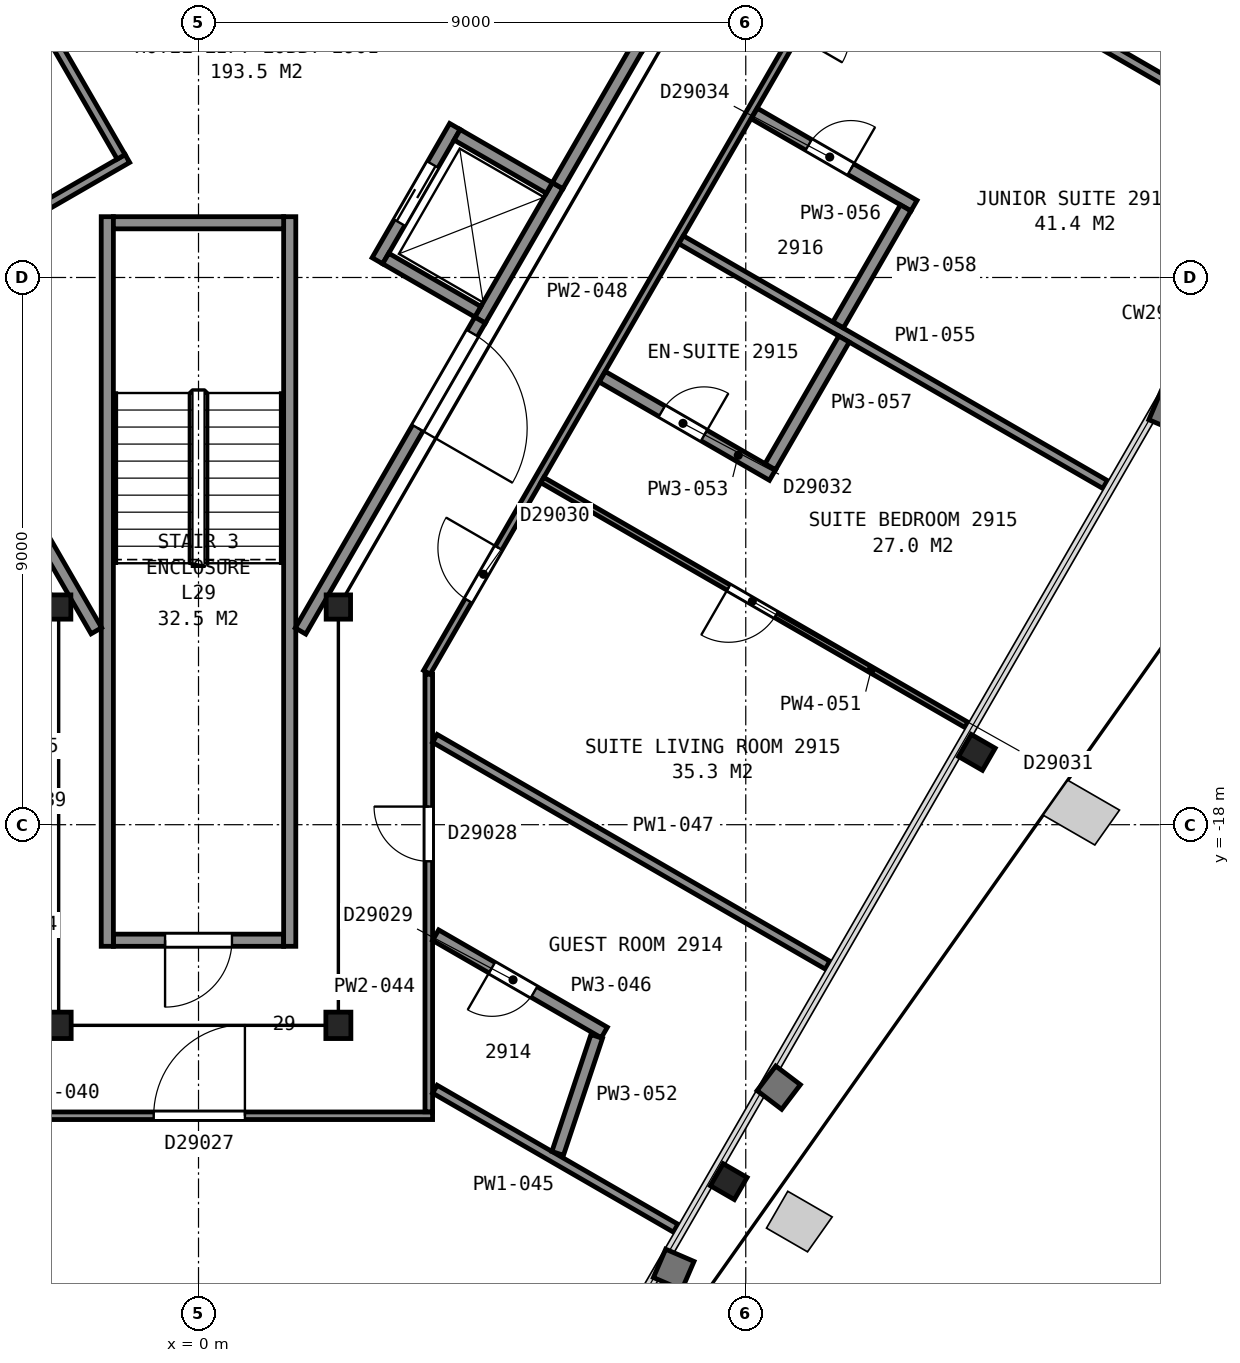
"""IFC4 building model, lengths in metres.
Left out: names, types, materials, properties, quantities, classifications, styles, units other than length and angle.
Written with IfcOpenShell. Run it as: python <this file> out.ifc"""

import sys

from ifc_helpers import new_model, si_unit, direction, frame, frame_2d, origin, origin_2d, place, context, subcontext, project, spatial, rectangle, i_section, extrude, element, fill, save


model = new_model("IFC4")
c1 = context("Model", 3, precision=1e-05, world=origin(), true_north=direction((0.0, 1.0)))
c2 = subcontext(c1, "Body", "Model", "MODEL_VIEW")
j1 = project(units=[si_unit("LENGTHUNIT", "METRE"), si_unit("PLANEANGLEUNIT", "RADIAN")], contexts=[c1])
p1 = place(None, origin())
s1 = spatial("IfcSite", under=j1, at=p1, CompositionType="ELEMENT")
p2 = place(p1, origin())
s2 = spatial("IfcBuilding", under=s1, at=p2, CompositionType="ELEMENT")
p3 = place(p2, frame((0.0, 0.0, 121.6)))
s3 = spatial("IfcBuildingStorey", under=s2, at=p3, CompositionType="ELEMENT", Elevation=121.6)
p4 = place(p3, frame((8.72, -23.87, 0.045), z_axis=(0.0, 0.0, 1.0), x_axis=(-0.5, -0.866025403784, 0.0)))
e1 = element("IfcColumn", 1, at=p4, inside=s3, PredefinedType="COLUMN", context=c2, shape_type="SweptSolid", body=[
    extrude(i_section(OverallWidth=0.419, OverallDepth=0.455, WebThickness=0.042, FlangeThickness=0.068, FilletRadius=0.015, at=origin_2d()), origin(), (0.0, 0.0, 1.0), 3.555),
])
p5 = place(p3, frame((12.8, -16.81, 0.04), z_axis=(0.0, 0.0, 1.0), x_axis=(-0.5, -0.866025403784, 0.0)))
e2 = element("IfcColumn", 2, at=p5, inside=s3, PredefinedType="COLUMN", context=c2, shape_type="SweptSolid", body=[
    extrude(i_section(OverallWidth=0.419, OverallDepth=0.455, WebThickness=0.042, FlangeThickness=0.068, FilletRadius=0.015, at=origin_2d()), origin(), (0.0, 0.0, 1.0), 3.56),
])
p6 = place(p3, frame((-2.3, -14.42, 0.0), z_axis=(0.0, 0.0, 1.0), x_axis=(1.0, 0.0, 0.0)))
e3 = element("IfcColumn", 3, at=p6, inside=s3, PredefinedType="COLUMN", context=c2, shape_type="SweptSolid", body=[
    extrude(i_section(OverallWidth=0.401, OverallDepth=0.399, WebThickness=0.025, FlangeThickness=0.04, FilletRadius=0.015, at=origin_2d()), origin(), (0.0, 0.0, 1.0), 3.6),
])
for number, where, z_axis, x_axis in (
    (4, (-2.3, -21.3, 0.0), (0.0, 0.0, 1.0), (-1.0, 0.0, 0.0)),
    (5, (2.3, -21.3, 0.0), (0.0, 0.0, 1.0), (-1.0, 0.0, 0.0)),
):
    element("IfcColumn", number, at=place(p3, frame(where, z_axis=z_axis, x_axis=x_axis)), inside=s3, PredefinedType="COLUMN", context=c2, shape_type="SweptSolid", body=[
        extrude(i_section(OverallWidth=0.411, OverallDepth=0.434, WebThickness=0.036, FlangeThickness=0.057, FilletRadius=0.015, at=origin_2d()), origin(), (0.0, 0.0, 1.0), 3.6),
    ])
p7 = place(p3, frame((2.3, -14.42, 0.0), z_axis=(0.0, 0.0, 1.0), x_axis=(1.0, 0.0, 0.0)))
e6 = element("IfcColumn", 6, at=p7, inside=s3, PredefinedType="COLUMN", context=c2, shape_type="SweptSolid", body=[
    extrude(i_section(OverallWidth=0.401, OverallDepth=0.399, WebThickness=0.025, FlangeThickness=0.04, FilletRadius=0.015, at=origin_2d()), origin(), (0.0, 0.0, 1.0), 3.6),
])
p8 = place(p3, frame((-1.4, -19.9, 0.0), z_axis=(0.0, 0.0, 1.0), x_axis=(1.0, 0.0, 0.0)))
e7 = element("IfcWall", 7, at=p8, inside=s3, PredefinedType="PARTITIONING", context=c2, shape_type="SweptSolid", body=[
    extrude(rectangle(XDim=2.8, YDim=0.2, at=frame_2d((1.4, 0.0))), origin(), (0.0, 0.0, 1.0), 3.35),
])
p9 = place(p8, frame((0.85, 0.0, 0.0)))
e8 = element("IfcOpeningElement", 8, at=p9, cuts=e7, PredefinedType="OPENING", context=c2, shape_type="SweptSolid", body=[
    extrude(rectangle(XDim=1.1, YDim=2.1, at=frame_2d((0.55, 1.05))), frame((0.0, 0.11, 0.0), z_axis=(0.0, -1.0, 0.0), x_axis=(1.0, 0.0, 0.0)), (0.0, 0.0, 1.0), 0.22),
])
for number, where, z_axis, x_axis in (
    (9, (1.5, -8.0, 0.0), (0.0, 0.0, 1.0), (0.0, -1.0, 0.0)),
    (10, (-1.5, -8.0, 0.0), (0.0, 0.0, 1.0), (0.0, -1.0, 0.0)),
):
    element("IfcWall", number, at=place(p3, frame(where, z_axis=z_axis, x_axis=x_axis)), inside=s3, PredefinedType="PARTITIONING", context=c2, shape_type="SweptSolid", body=[
        extrude(rectangle(XDim=12.0, YDim=0.2, at=frame_2d((6.0, 0.0))), origin(), (0.0, 0.0, 1.0), 3.35),
    ])
p10 = place(p3, frame((-1.4, -8.1, 0.0), z_axis=(0.0, 0.0, 1.0), x_axis=(1.0, 0.0, 0.0)))
e11 = element("IfcWall", 11, at=p10, inside=s3, PredefinedType="PARTITIONING", context=c2, shape_type="SweptSolid", body=[
    extrude(rectangle(XDim=2.8, YDim=0.2, at=frame_2d((1.4, 0.0))), origin(), (0.0, 0.0, 1.0), 3.35),
])
p11 = place(p3, frame((4.63, -9.7, 0.0), z_axis=(0.0, 0.0, 1.0), x_axis=(0.500062241894, 0.865989465428, 0.0)))
e12 = element("IfcWall", 12, at=p11, inside=s3, PredefinedType="PARTITIONING", context=c2, shape_type="SweptSolid", body=[
    extrude(rectangle(XDim=2.55, YDim=0.2, at=frame_2d((1.275, 0.0))), origin(), (0.0, 0.0, 1.0), 3.6),
])
p12 = place(p3, frame((2.942, -8.725, 0.0), z_axis=(0.0, 0.0, 1.0), x_axis=(0.500020783669, 0.866013403995, 0.0)))
e13 = element("IfcWall", 13, at=p12, inside=s3, PredefinedType="PARTITIONING", context=c2, shape_type="SweptSolid", body=[
    extrude(rectangle(XDim=2.55, YDim=0.2, at=frame_2d((1.275, 0.0))), origin(), (0.0, 0.0, 1.0), 3.6),
])
p13 = place(p12, frame((0.725, 0.0, 0.0)))
e14 = element("IfcOpeningElement", 14, at=p13, cuts=e13, PredefinedType="OPENING", context=c2, shape_type="SweptSolid", body=[
    extrude(rectangle(XDim=1.1, YDim=2.1, at=frame_2d((0.55, 1.05))), frame((0.0, 0.11, 0.0), z_axis=(0.0, -1.0, 0.0), x_axis=(1.0, 0.0, 0.0)), (0.0, 0.0, 1.0), 0.22),
])
p14 = place(p3, frame((5.769, -7.528, 0.0), z_axis=(0.0, 0.0, 1.0), x_axis=(-0.866002029911, 0.500040482552, 0.0)))
e15 = element("IfcWall", 15, at=p14, inside=s3, PredefinedType="PARTITIONING", context=c2, shape_type="SweptSolid", body=[
    extrude(rectangle(XDim=1.75, YDim=0.2, at=frame_2d((0.875, 0.0))), origin(), (0.0, 0.0, 1.0), 3.6),
])
p15 = place(p3, frame((4.594, -9.563, 0.0), z_axis=(0.0, 0.0, 1.0), x_axis=(-0.866036909293, 0.499980071345, 0.0)))
e16 = element("IfcWall", 16, at=p15, inside=s3, PredefinedType="PARTITIONING", context=c2, shape_type="SweptSolid", body=[
    extrude(rectangle(XDim=1.75, YDim=0.2, at=frame_2d((0.875, 0.0))), origin(), (0.0, 0.0, 1.0), 3.6),
])
p16 = place(p3, frame((-13.664, 5.946, 0.0), z_axis=(0.0, 0.0, 1.0), x_axis=(0.499994327219, -0.866028678941, 0.0)))
e17 = element("IfcWall", 17, at=p16, inside=s3, PredefinedType="PARTITIONING", context=c2, shape_type="SweptSolid", body=[
    extrude(rectangle(XDim=23.968, YDim=0.2, at=frame_2d((11.984, 0.0))), origin(), (0.0, 0.0, 1.0), 3.35),
])
p17 = place(p3, frame((-4.825, -9.154, 0.0), z_axis=(0.0, 0.0, 1.0), x_axis=(0.866023738697, 0.500002884005, 0.0)))
e18 = element("IfcWall", 18, at=p17, inside=s3, PredefinedType="PARTITIONING", context=c2, shape_type="SweptSolid", body=[
    extrude(rectangle(XDim=4.22, YDim=0.15, at=frame_2d((2.11, 0.0))), origin(), (0.0, 0.0, 1.0), 3.35),
])
p18 = place(p17, frame((1.595, 0.0, 0.0)))
e19 = element("IfcOpeningElement", 19, at=p18, cuts=e18, PredefinedType="OPENING", context=c2, shape_type="SweptSolid", body=[
    extrude(rectangle(XDim=0.9, YDim=2.1, at=frame_2d((0.45, 1.05))), frame((0.0, 0.085, 0.0), z_axis=(0.0, -1.0, 0.0), x_axis=(1.0, 0.0, 0.0)), (0.0, 0.0, 1.0), 0.17),
])
p19 = place(p3, frame((-2.472, -4.938, 0.0), z_axis=(0.0, 0.0, 1.0), x_axis=(0.500045362686, -0.865999212041, 0.0)))
e20 = element("IfcWall", 20, at=p19, inside=s3, PredefinedType="PARTITIONING", context=c2, shape_type="SweptSolid", body=[
    extrude(rectangle(XDim=2.4, YDim=0.15, at=frame_2d((1.2, 0.0))), origin(), (0.0, 0.0, 1.0), 3.35),
])
p20 = place(p3, frame((1.677, -14.815, 0.0), z_axis=(0.0, 0.0, 1.0), x_axis=(0.49999445743, 0.866028603765, 0.0)))
e21 = element("IfcWall", 21, at=p20, inside=s3, PredefinedType="PARTITIONING", context=c2, shape_type="SweptSolid", body=[
    extrude(rectangle(XDim=5.905, YDim=0.2, at=frame_2d((2.952, 0.0))), origin(), (0.0, 0.0, 1.0), 3.35),
])
p21 = place(p20, frame((3.855, 0.0, 0.0)))
e22 = element("IfcOpeningElement", 22, at=p21, cuts=e21, PredefinedType="OPENING", context=c2, shape_type="SweptSolid", body=[
    extrude(rectangle(XDim=1.8, YDim=2.1, at=frame_2d((0.9, 1.05))), frame((0.0, 0.11, 0.0), z_axis=(0.0, -1.0, 0.0), x_axis=(1.0, 0.0, 0.0)), (0.0, 0.0, 1.0), 0.22),
])
p22 = place(p3, frame((5.906, -7.49, 0.0), z_axis=(0.0, 0.0, 1.0), x_axis=(0.500252727967, 0.865879442048, 0.0)))
e23 = element("IfcWall", 23, at=p22, inside=s3, PredefinedType="PARTITIONING", context=c2, shape_type="SweptSolid", body=[
    extrude(rectangle(XDim=2.617, YDim=0.2, at=frame_2d((1.309, 0.0))), origin(), (0.0, 0.0, 1.0), 3.35),
])
p23 = place(p3, frame((3.85, -22.787, 0.0), z_axis=(0.0, 0.0, 1.0), x_axis=(-1.0, 0.0, 0.0)))
e24 = element("IfcWall", 24, at=p23, inside=s3, PredefinedType="PARTITIONING", context=c2, shape_type="SweptSolid", body=[
    extrude(rectangle(XDim=7.699, YDim=0.125, at=frame_2d((3.85, 0.0))), origin(), (0.0, 0.0, 1.0), 2.613),
])
p24 = place(p23, frame((3.086, 0.0, 0.0)))
e25 = element("IfcOpeningElement", 25, at=p24, cuts=e24, PredefinedType="OPENING", context=c2, shape_type="SweptSolid", body=[
    extrude(rectangle(XDim=1.5, YDim=2.1, at=frame_2d((0.75, 1.05))), frame((0.0, 0.073, 0.0), z_axis=(0.0, -1.0, 0.0), x_axis=(1.0, 0.0, 0.0)), (0.0, 0.0, 1.0), 0.145),
])
p25 = place(p3, frame((3.787, -15.525, 0.0), z_axis=(0.0, 0.0, 1.0), x_axis=(0.0, -1.0, 0.0)))
e26 = element("IfcWall", 26, at=p25, inside=s3, PredefinedType="PARTITIONING", context=c2, shape_type="SweptSolid", body=[
    extrude(rectangle(XDim=7.197, YDim=0.125, at=frame_2d((3.599, 0.0))), origin(), (0.0, 0.0, 1.0), 2.613),
])
p26 = place(p25, frame((2.177, 0.0, 0.0)))
e27 = element("IfcOpeningElement", 27, at=p26, cuts=e26, PredefinedType="OPENING", context=c2, shape_type="SweptSolid", body=[
    extrude(rectangle(XDim=0.9, YDim=2.1, at=frame_2d((0.45, 1.05))), frame((0.0, 0.073, 0.0), z_axis=(0.0, -1.0, 0.0), x_axis=(1.0, 0.0, 0.0)), (0.0, 0.0, 1.0), 0.145),
])
p27 = place(p3, frame((3.887, -22.35, 0.0), z_axis=(0.0, 0.0, 1.0), x_axis=(0.866046917185, -0.499962735845, 0.0)))
e28 = element("IfcWall", 28, at=p27, inside=s3, PredefinedType="PARTITIONING", context=c2, shape_type="SweptSolid", body=[
    extrude(rectangle(XDim=4.573, YDim=0.15, at=frame_2d((2.287, 0.0))), origin(), (0.0, 0.0, 1.0), 2.613),
])
p28 = place(p3, frame((6.674, -21.418, 0.0), z_axis=(0.0, 0.0, 1.0), x_axis=(-0.866105631149, 0.499861016376, 0.0)))
e29 = element("IfcWall", 29, at=p28, inside=s3, PredefinedType="PARTITIONING", context=c2, shape_type="SweptSolid", body=[
    extrude(rectangle(XDim=3.203, YDim=0.2, at=frame_2d((1.602, 0.0))), origin(), (0.0, 0.0, 1.0), 2.613),
])
p29 = place(p28, frame((1.333, 0.0, 0.0)))
e30 = element("IfcOpeningElement", 30, at=p29, cuts=e29, PredefinedType="OPENING", context=c2, shape_type="SweptSolid", body=[
    extrude(rectangle(XDim=0.8, YDim=2.1, at=frame_2d((0.4, 1.05))), frame((0.0, 0.11, 0.0), z_axis=(0.0, -1.0, 0.0), x_axis=(1.0, 0.0, 0.0)), (0.0, 0.0, 1.0), 0.22),
])
p30 = place(p3, frame((3.887, -16.581, 0.0), z_axis=(0.0, 0.0, 1.0), x_axis=(0.866008413041, -0.500029427677, 0.0)))
e31 = element("IfcWall", 31, at=p30, inside=s3, PredefinedType="PARTITIONING", context=c2, shape_type="SweptSolid", body=[
    extrude(rectangle(XDim=7.458, YDim=0.15, at=frame_2d((3.729, 0.0))), origin(), (0.0, 0.0, 1.0), 2.613),
])
p31 = place(p3, frame((15.684, 5.165, 0.0), z_axis=(0.0, 0.0, 1.0), x_axis=(-0.500027787016, -0.866009360349, 0.0)))
e32 = element("IfcWall", 32, at=p31, inside=s3, PredefinedType="PARTITIONING", context=c2, shape_type="SweptSolid", body=[
    extrude(rectangle(XDim=23.856, YDim=0.125, at=frame_2d((11.928, 0.0))), origin(), (0.0, 0.0, 1.0), 2.613),
])
p32 = place(p31, frame((21.493, 0.0, 0.0)))
e33 = element("IfcOpeningElement", 33, at=p32, cuts=e32, PredefinedType="OPENING", context=c2, shape_type="SweptSolid", body=[
    extrude(rectangle(XDim=1.0, YDim=2.1, at=frame_2d((0.5, 1.05))), frame((0.0, 0.073, 0.0), z_axis=(0.0, -1.0, 0.0), x_axis=(1.0, 0.0, 0.0)), (0.0, 0.0, 1.0), 0.145),
])
p33 = place(p31, frame((10.853, 0.0, 0.0)))
e34 = element("IfcOpeningElement", 34, at=p33, cuts=e32, PredefinedType="OPENING", context=c2, shape_type="SweptSolid", body=[
    extrude(rectangle(XDim=0.9, YDim=2.1, at=frame_2d((0.45, 1.05))), frame((0.0, 0.073, 0.0), z_axis=(0.0, -1.0, 0.0), x_axis=(1.0, 0.0, 0.0)), (0.0, 0.0, 1.0), 0.145),
])
p34 = place(p31, frame((6.558, 0.0, 0.0)))
e35 = element("IfcOpeningElement", 35, at=p34, cuts=e32, PredefinedType="OPENING", context=c2, shape_type="SweptSolid", body=[
    extrude(rectangle(XDim=1.0, YDim=2.1, at=frame_2d((0.5, 1.05))), frame((0.0, 0.073, 0.0), z_axis=(0.0, -1.0, 0.0), x_axis=(1.0, 0.0, 0.0)), (0.0, 0.0, 1.0), 0.145),
])
p35 = place(p3, frame((5.654, -12.331, 0.0), z_axis=(0.0, 0.0, 1.0), x_axis=(0.866051796338, -0.49995428397, 0.0)))
e36 = element("IfcWall", 36, at=p35, inside=s3, PredefinedType="PARTITIONING", context=c2, shape_type="SweptSolid", body=[
    extrude(rectangle(XDim=8.052, YDim=0.1, at=frame_2d((4.026, 0.0))), origin(), (0.0, 0.0, 1.0), 2.613),
])
p36 = place(p35, frame((3.538, 0.0, 0.0)))
e37 = element("IfcOpeningElement", 37, at=p36, cuts=e36, PredefinedType="OPENING", context=c2, shape_type="SweptSolid", body=[
    extrude(rectangle(XDim=0.9, YDim=2.1, at=frame_2d((0.45, 1.05))), frame((0.0, 0.06, 0.0), z_axis=(0.0, -1.0, 0.0), x_axis=(1.0, 0.0, 0.0)), (0.0, 0.0, 1.0), 0.12),
])
p37 = place(p3, frame((5.907, -23.406, 0.0), z_axis=(0.0, 0.0, 1.0), x_axis=(0.316661020634, 0.948538769904, 0.0)))
e38 = element("IfcWall", 38, at=p37, inside=s3, PredefinedType="PARTITIONING", context=c2, shape_type="SweptSolid", body=[
    extrude(rectangle(XDim=2.029, YDim=0.2, at=frame_2d((1.014, 0.0))), origin(), (0.0, 0.0, 1.0), 2.613),
])
p38 = place(p3, frame((6.64, -10.633, 0.0), z_axis=(0.0, 0.0, 1.0), x_axis=(0.866022073929, -0.500005767435, 0.0)))
e39 = element("IfcWall", 39, at=p38, inside=s3, PredefinedType="PARTITIONING", context=c2, shape_type="SweptSolid", body=[
    extrude(rectangle(XDim=3.232, YDim=0.2, at=frame_2d((1.616, 0.0))), origin(), (0.0, 0.0, 1.0), 2.613),
])
p39 = place(p38, frame((1.133, 0.0, 0.0)))
e40 = element("IfcOpeningElement", 40, at=p39, cuts=e39, PredefinedType="OPENING", context=c2, shape_type="SweptSolid", body=[
    extrude(rectangle(XDim=0.8, YDim=2.1, at=frame_2d((0.4, 1.05))), frame((0.0, 0.11, 0.0), z_axis=(0.0, -1.0, 0.0), x_axis=(1.0, 0.0, 0.0)), (0.0, 0.0, 1.0), 0.22),
])
p40 = place(p3, frame((7.936, -8.379, 0.0), z_axis=(0.0, 0.0, 1.0), x_axis=(0.866044217767, -0.499967411811, 0.0)))
e41 = element("IfcWall", 41, at=p40, inside=s3, PredefinedType="PARTITIONING", context=c2, shape_type="SweptSolid", body=[
    extrude(rectangle(XDim=8.052, YDim=0.15, at=frame_2d((4.026, 0.0))), origin(), (0.0, 0.0, 1.0), 2.613),
])
p41 = place(p3, frame((11.767, -7.819, 0.0), z_axis=(0.0, 0.0, 1.0), x_axis=(-0.866009954834, 0.500026757412, 0.0)))
e42 = element("IfcWall", 42, at=p41, inside=s3, PredefinedType="PARTITIONING", context=c2, shape_type="SweptSolid", body=[
    extrude(rectangle(XDim=3.032, YDim=0.2, at=frame_2d((1.516, 0.0))), origin(), (0.0, 0.0, 1.0), 2.613),
])
p42 = place(p41, frame((1.2, 0.0, 0.0)))
e43 = element("IfcOpeningElement", 43, at=p42, cuts=e42, PredefinedType="OPENING", context=c2, shape_type="SweptSolid", body=[
    extrude(rectangle(XDim=0.8, YDim=2.1, at=frame_2d((0.4, 1.05))), frame((0.0, 0.11, 0.0), z_axis=(0.0, -1.0, 0.0), x_axis=(1.0, 0.0, 0.0)), (0.0, 0.0, 1.0), 0.22),
])
p43 = place(p3, frame((9.403, -12.112, 0.0), z_axis=(0.0, 0.0, 1.0), x_axis=(0.500103096288, 0.865965872932, 0.0)))
e44 = element("IfcWall", 44, at=p43, inside=s3, PredefinedType="PARTITIONING", context=c2, shape_type="SweptSolid", body=[
    extrude(rectangle(XDim=2.424, YDim=0.2, at=frame_2d((1.212, 0.0))), origin(), (0.0, 0.0, 1.0), 2.613),
])
p44 = place(p3, frame((10.52, -9.779, 0.0), z_axis=(0.0, 0.0, 1.0), x_axis=(0.499935013329, 0.866062920605, 0.0)))
e45 = element("IfcWall", 45, at=p44, inside=s3, PredefinedType="PARTITIONING", context=c2, shape_type="SweptSolid", body=[
    extrude(rectangle(XDim=2.22, YDim=0.2, at=frame_2d((1.11, 0.0))), origin(), (0.0, 0.0, 1.0), 2.613),
])
p45 = place(p3, frame((11.059, -2.97, 0.0), z_axis=(0.0, 0.0, 1.0), x_axis=(0.865968957472, -0.500097755139, 0.0)))
e46 = element("IfcWall", 46, at=p45, inside=s3, PredefinedType="PARTITIONING", context=c2, shape_type="SweptSolid", body=[
    extrude(rectangle(XDim=8.052, YDim=0.15, at=frame_2d((4.026, 0.0))), origin(), (0.0, 0.0, 1.0), 2.613),
])
p46 = place(p9, origin())
e47 = element("IfcDoor", 47, at=p46, inside=s3, OperationType="SINGLE_SWING_LEFT", PredefinedType="DOOR", context=c2, shape_type="SweptSolid", body=[
    extrude(rectangle(XDim=1.1, YDim=2.1, at=frame_2d((0.55, 1.05))), frame((0.0, 0.025, 0.0), z_axis=(0.0, -1.0, 0.0), x_axis=(1.0, 0.0, 0.0)), (0.0, 0.0, 1.0), 0.05),
])
fill(e8, e47)
p47 = place(p13, origin())
e48 = element("IfcDoor", 48, at=p47, inside=s3, OperationType="SLIDING_TO_RIGHT", PredefinedType="DOOR", context=c2, shape_type="SweptSolid", body=[
    extrude(rectangle(XDim=1.1, YDim=2.1, at=frame_2d((0.55, 1.05))), frame((0.0, 0.025, 0.0), z_axis=(0.0, -1.0, 0.0), x_axis=(1.0, 0.0, 0.0)), (0.0, 0.0, 1.0), 0.05),
])
fill(e14, e48)
p48 = place(p21, origin())
e49 = element("IfcDoor", 49, at=p48, inside=s3, OperationType="DOUBLE_DOOR_SINGLE_SWING", PredefinedType="DOOR", context=c2, shape_type="SweptSolid", body=[
    extrude(rectangle(XDim=1.8, YDim=2.1, at=frame_2d((0.9, 1.05))), frame((0.0, 0.025, 0.0), z_axis=(0.0, -1.0, 0.0), x_axis=(1.0, 0.0, 0.0)), (0.0, 0.0, 1.0), 0.05),
])
fill(e22, e49)
p49 = place(p24, origin())
e50 = element("IfcDoor", 50, at=p49, inside=s3, OperationType="DOUBLE_DOOR_SINGLE_SWING", PredefinedType="DOOR", context=c2, shape_type="SweptSolid", body=[
    extrude(rectangle(XDim=1.5, YDim=2.1, at=frame_2d((0.75, 1.05))), frame((0.0, 0.025, 0.0), z_axis=(0.0, -1.0, 0.0), x_axis=(1.0, 0.0, 0.0)), (0.0, 0.0, 1.0), 0.05),
])
fill(e25, e50)
p50 = place(p26, origin())
e51 = element("IfcDoor", 51, at=p50, inside=s3, OperationType="SINGLE_SWING_LEFT", PredefinedType="DOOR", context=c2, shape_type="SweptSolid", body=[
    extrude(rectangle(XDim=0.9, YDim=2.1, at=frame_2d((0.45, 1.05))), frame((0.0, 0.025, 0.0), z_axis=(0.0, -1.0, 0.0), x_axis=(1.0, 0.0, 0.0)), (0.0, 0.0, 1.0), 0.05),
])
fill(e27, e51)
p51 = place(p29, origin())
e52 = element("IfcDoor", 52, at=p51, inside=s3, OperationType="SINGLE_SWING_RIGHT", PredefinedType="DOOR", context=c2, shape_type="SweptSolid", body=[
    extrude(rectangle(XDim=0.8, YDim=2.1, at=frame_2d((0.4, 1.05))), frame((0.0, 0.025, 0.0), z_axis=(0.0, -1.0, 0.0), x_axis=(1.0, 0.0, 0.0)), (0.0, 0.0, 1.0), 0.05),
])
fill(e30, e52)
p52 = place(p32, origin())
e53 = element("IfcDoor", 53, at=p52, inside=s3, OperationType="SINGLE_SWING_LEFT", PredefinedType="DOOR", context=c2, shape_type="SweptSolid", body=[
    extrude(rectangle(XDim=1.0, YDim=2.1, at=frame_2d((0.5, 1.05))), frame((0.0, 0.025, 0.0), z_axis=(0.0, -1.0, 0.0), x_axis=(1.0, 0.0, 0.0)), (0.0, 0.0, 1.0), 0.05),
])
fill(e33, e53)
p53 = place(p36, origin())
e54 = element("IfcDoor", 54, at=p53, inside=s3, OperationType="SINGLE_SWING_LEFT", PredefinedType="DOOR", context=c2, shape_type="SweptSolid", body=[
    extrude(rectangle(XDim=0.9, YDim=2.1, at=frame_2d((0.45, 1.05))), frame((0.0, 0.025, 0.0), z_axis=(0.0, -1.0, 0.0), x_axis=(1.0, 0.0, 0.0)), (0.0, 0.0, 1.0), 0.05),
])
fill(e37, e54)
p54 = place(p39, origin())
e55 = element("IfcDoor", 55, at=p54, inside=s3, OperationType="SINGLE_SWING_RIGHT", PredefinedType="DOOR", context=c2, shape_type="SweptSolid", body=[
    extrude(rectangle(XDim=0.8, YDim=2.1, at=frame_2d((0.4, 1.05))), frame((0.0, 0.025, 0.0), z_axis=(0.0, -1.0, 0.0), x_axis=(1.0, 0.0, 0.0)), (0.0, 0.0, 1.0), 0.05),
])
fill(e40, e55)
p55 = place(p42, origin())
e56 = element("IfcDoor", 56, at=p55, inside=s3, OperationType="SINGLE_SWING_LEFT", PredefinedType="DOOR", context=c2, shape_type="SweptSolid", body=[
    extrude(rectangle(XDim=0.8, YDim=2.1, at=frame_2d((0.4, 1.05))), frame((0.0, 0.025, 0.0), z_axis=(0.0, -1.0, 0.0), x_axis=(1.0, 0.0, 0.0)), (0.0, 0.0, 1.0), 0.05),
])
fill(e43, e56)
save(model, sys.argv[1])
